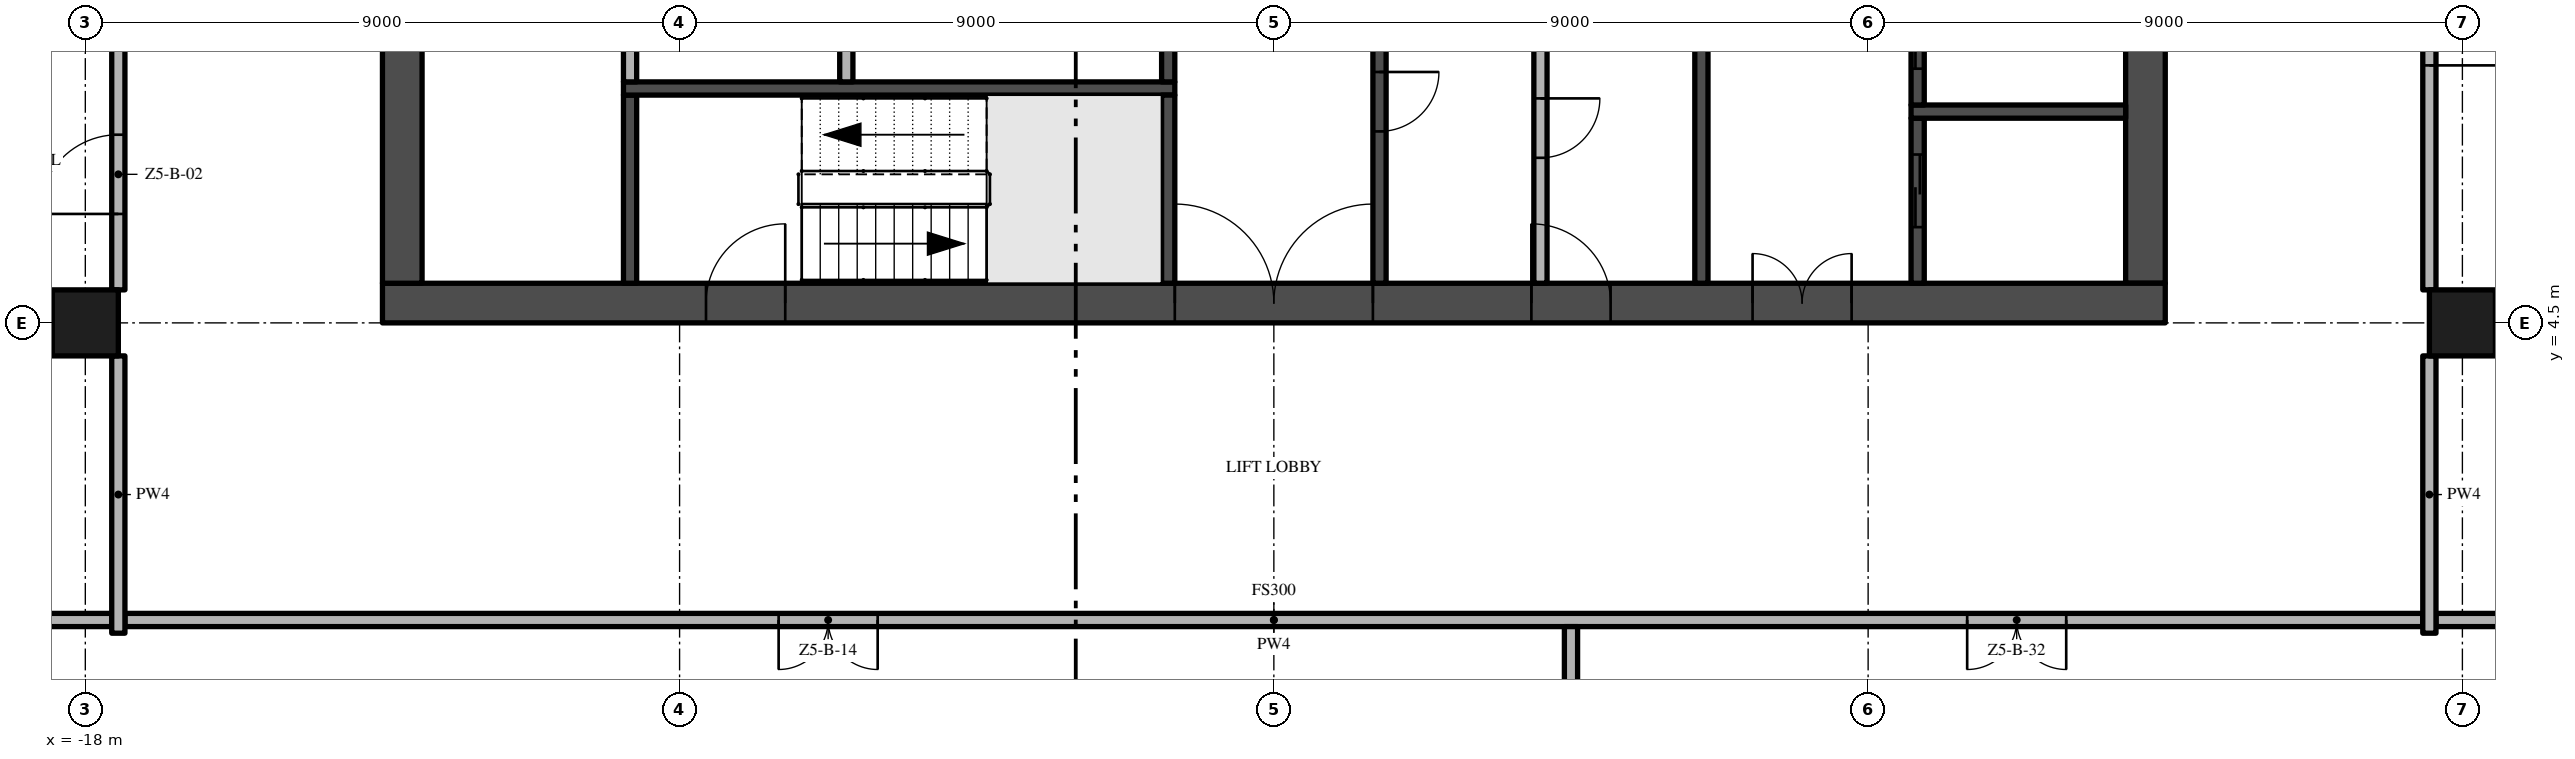
"""IFC4 building model, lengths in metres.
Left out: names, types, materials, properties, quantities, classifications, styles, units other than length and angle.
Written with IfcOpenShell. Run it as: python <this file> out.ifc"""

import sys

from ifc_helpers import new_model, si_unit, direction, frame, frame_2d, origin, origin_2d, place, context, subcontext, project, spatial, rectangle, extrude, element, fill, save


model = new_model("IFC4")
c1 = context("Model", 3, precision=1e-05, world=origin(), true_north=direction((0.0, 1.0)))
c2 = subcontext(c1, "Body", "Model", "MODEL_VIEW")
j1 = project(units=[si_unit("LENGTHUNIT", "METRE"), si_unit("PLANEANGLEUNIT", "RADIAN")], contexts=[c1])
p1 = place(None, origin())
s1 = spatial("IfcSite", under=j1, at=p1, CompositionType="ELEMENT")
p2 = place(p1, origin())
s2 = spatial("IfcBuilding", under=s1, at=p2, CompositionType="ELEMENT")
p3 = place(p2, frame((0.0, 0.0, 254.0)))
s3 = spatial("IfcBuildingStorey", under=s2, at=p3, CompositionType="ELEMENT", Elevation=254.0)
p4 = place(p3, frame((-13.5, 4.8, -0.3), z_axis=(0.0, 0.0, 1.0), x_axis=(1.0, 0.0, 0.0)))
e1 = element("IfcWall", 1, at=p4, inside=s3, PredefinedType="SHEAR", context=c2, shape_type="SweptSolid", body=[
    extrude(rectangle(XDim=27.0, YDim=0.6, at=frame_2d((13.5, 0.0))), origin(), (0.0, 0.0, 1.0), 3.8),
])
p5 = place(p4, frame((12.0, 0.0, 0.3)))
e2 = element("IfcOpeningElement", 2, at=p5, cuts=e1, PredefinedType="OPENING", context=c2, shape_type="SweptSolid", body=[
    extrude(rectangle(XDim=3.0, YDim=2.4, at=frame_2d((1.5, 1.2))), frame((0.0, 0.31, 0.0), z_axis=(0.0, -1.0, 0.0), x_axis=(1.0, 0.0, 0.0)), (0.0, 0.0, 1.0), 0.62),
])
p6 = place(p4, frame((4.9, 0.0, 0.3)))
e3 = element("IfcOpeningElement", 3, at=p6, cuts=e1, PredefinedType="OPENING", context=c2, shape_type="SweptSolid", body=[
    extrude(rectangle(XDim=1.2, YDim=2.2, at=frame_2d((0.6, 1.1))), frame((0.0, 0.31, 0.0), z_axis=(0.0, -1.0, 0.0), x_axis=(1.0, 0.0, 0.0)), (0.0, 0.0, 1.0), 0.62),
])
p7 = place(p4, frame((20.75, 0.0, 0.3)))
e4 = element("IfcOpeningElement", 4, at=p7, cuts=e1, PredefinedType="OPENING", context=c2, shape_type="SweptSolid", body=[
    extrude(rectangle(XDim=1.5, YDim=2.2, at=frame_2d((0.75, 1.1))), frame((0.0, 0.31, 0.0), z_axis=(0.0, -1.0, 0.0), x_axis=(1.0, 0.0, 0.0)), (0.0, 0.0, 1.0), 0.62),
])
p8 = place(p4, frame((17.4, 0.0, 0.3)))
e5 = element("IfcOpeningElement", 5, at=p8, cuts=e1, PredefinedType="OPENING", context=c2, shape_type="SweptSolid", body=[
    extrude(rectangle(XDim=1.2, YDim=2.2, at=frame_2d((0.6, 1.1))), frame((0.0, 0.31, 0.0), z_axis=(0.0, -1.0, 0.0), x_axis=(1.0, 0.0, 0.0)), (0.0, 0.0, 1.0), 0.62),
])
p9 = place(p3, frame((13.2, 5.1, -0.3), z_axis=(0.0, 0.0, 1.0), x_axis=(0.0, 1.0, 0.0)))
e6 = element("IfcWall", 6, at=p9, inside=s3, PredefinedType="SHEAR", context=c2, shape_type="SweptSolid", body=[
    extrude(rectangle(XDim=16.8, YDim=0.6, at=frame_2d((8.4, 0.0))), origin(), (0.0, 0.0, 1.0), 3.8),
])
p10 = place(p9, frame((6.3, 0.0, 0.3)))
e7 = element("IfcOpeningElement", 7, at=p10, cuts=e6, PredefinedType="OPENING", context=c2, shape_type="SweptSolid", body=[
    extrude(rectangle(XDim=1.2, YDim=2.2, at=frame_2d((0.6, 1.1))), frame((0.0, 0.31, 0.0), z_axis=(0.0, -1.0, 0.0), x_axis=(1.0, 0.0, 0.0)), (0.0, 0.0, 1.0), 0.62),
])
p11 = place(p3, frame((-13.2, 21.9, -0.3), z_axis=(0.0, 0.0, 1.0), x_axis=(0.0, -1.0, 0.0)))
e8 = element("IfcWall", 8, at=p11, inside=s3, PredefinedType="SHEAR", context=c2, shape_type="SweptSolid", body=[
    extrude(rectangle(XDim=16.8, YDim=0.6, at=frame_2d((8.4, 0.0))), origin(), (0.0, 0.0, 1.0), 3.8),
])
p12 = place(p11, frame((9.3, 0.0, 0.3)))
e9 = element("IfcOpeningElement", 9, at=p12, cuts=e8, PredefinedType="OPENING", context=c2, shape_type="SweptSolid", body=[
    extrude(rectangle(XDim=1.2, YDim=2.2, at=frame_2d((0.6, 1.1))), frame((0.0, 0.31, 0.0), z_axis=(0.0, -1.0, 0.0), x_axis=(1.0, 0.0, 0.0)), (0.0, 0.0, 1.0), 0.62),
])
for number, where, z_axis, x_axis in (
    (10, (-18.0, 4.5, 0.0), (0.0, 0.0, 1.0), (1.0, 0.0, 0.0)),
    (11, (18.0, 4.5, 0.0), (0.0, 0.0, 1.0), (1.0, 0.0, 0.0)),
):
    element("IfcColumn", number, at=place(p3, frame(where, z_axis=z_axis, x_axis=x_axis)), inside=s3, PredefinedType="COLUMN", context=c2, shape_type="SweptSolid", body=[
        extrude(rectangle(XDim=1.0, YDim=1.0, at=origin_2d()), origin(), (0.0, 0.0, 1.0), 3.5),
    ])
p13 = place(p3, frame((-9.75, 5.1, 0.0), z_axis=(0.0, 0.0, 1.0), x_axis=(0.0, 1.0, 0.0)))
e12 = element("IfcWall", 12, at=p13, inside=s3, PredefinedType="SHEAR", context=c2, shape_type="SweptSolid", body=[
    extrude(rectangle(XDim=2.85, YDim=0.2, at=frame_2d((1.425, 0.0))), origin(), (0.0, 0.0, 1.0), 3.5),
])
p14 = place(p3, frame((-9.85, 8.05, 0.0), z_axis=(0.0, 0.0, 1.0), x_axis=(1.0, 0.0, 0.0)))
e13 = element("IfcWall", 13, at=p14, inside=s3, PredefinedType="SHEAR", context=c2, shape_type="SweptSolid", body=[
    extrude(rectangle(XDim=8.35, YDim=0.2, at=frame_2d((4.175, 0.0))), origin(), (0.0, 0.0, 1.0), 3.5),
])
p15 = place(p3, frame((-9.75, 8.15, 0.0), z_axis=(0.0, 0.0, 1.0), x_axis=(0.0, 1.0, 0.0)))
e14 = element("IfcWall", 14, at=p15, inside=s3, PredefinedType="PARTITIONING", context=c2, shape_type="SweptSolid", body=[
    extrude(rectangle(XDim=1.85, YDim=0.2, at=frame_2d((0.925, 0.0))), origin(), (0.0, 0.0, 1.0), 3.5),
])
p16 = place(p15, frame((0.475, 0.0, 0.0)))
e15 = element("IfcOpeningElement", 15, at=p16, cuts=e14, PredefinedType="OPENING", context=c2, shape_type="SweptSolid", body=[
    extrude(rectangle(XDim=0.9, YDim=2.1, at=frame_2d((0.45, 1.05))), frame((0.0, 0.11, 0.0), z_axis=(0.0, -1.0, 0.0), x_axis=(1.0, 0.0, 0.0)), (0.0, 0.0, 1.0), 0.22),
])
p17 = place(p3, frame((-6.475, 8.15, 0.0), z_axis=(0.0, 0.0, 1.0), x_axis=(0.0, 1.0, 0.0)))
e16 = element("IfcWall", 16, at=p17, inside=s3, PredefinedType="PARTITIONING", context=c2, shape_type="SweptSolid", body=[
    extrude(rectangle(XDim=5.35, YDim=0.2, at=frame_2d((2.675, 0.0))), origin(), (0.0, 0.0, 1.0), 3.5),
])
p18 = place(p3, frame((-1.6, 5.1, 0.0), z_axis=(0.0, 0.0, 1.0), x_axis=(0.0, 1.0, 0.0)))
e17 = element("IfcWall", 17, at=p18, inside=s3, PredefinedType="SHEAR", context=c2, shape_type="SweptSolid", body=[
    extrude(rectangle(XDim=2.85, YDim=0.2, at=frame_2d((1.425, 0.0))), origin(), (0.0, 0.0, 1.0), 3.5),
])
p19 = place(p3, frame((-1.6, 8.15, 0.0), z_axis=(0.0, 0.0, 1.0), x_axis=(0.0, 1.0, 0.0)))
e18 = element("IfcWall", 18, at=p19, inside=s3, PredefinedType="SHEAR", context=c2, shape_type="SweptSolid", body=[
    extrude(rectangle(XDim=5.35, YDim=0.2, at=frame_2d((2.675, 0.0))), origin(), (0.0, 0.0, 1.0), 3.5),
])
p20 = place(p19, frame((2.225, 0.0, 0.0)))
e19 = element("IfcOpeningElement", 19, at=p20, cuts=e18, PredefinedType="OPENING", context=c2, shape_type="SweptSolid", body=[
    extrude(rectangle(XDim=0.9, YDim=2.1, at=frame_2d((0.45, 1.05))), frame((0.0, 0.11, 0.0), z_axis=(0.0, -1.0, 0.0), x_axis=(1.0, 0.0, 0.0)), (0.0, 0.0, 1.0), 0.22),
])
p21 = place(p3, frame((1.6, 9.8, 0.0), z_axis=(0.0, 0.0, 1.0), x_axis=(0.0, -1.0, 0.0)))
e20 = element("IfcWall", 20, at=p21, inside=s3, PredefinedType="SHEAR", context=c2, shape_type="SweptSolid", body=[
    extrude(rectangle(XDim=4.7, YDim=0.2, at=frame_2d((2.35, 0.0))), origin(), (0.0, 0.0, 1.0), 3.5),
])
p22 = place(p21, frame((1.5, 0.0, 0.0)))
e21 = element("IfcOpeningElement", 21, at=p22, cuts=e20, PredefinedType="OPENING", context=c2, shape_type="SweptSolid", body=[
    extrude(rectangle(XDim=0.9, YDim=2.1, at=frame_2d((0.45, 1.05))), frame((0.0, 0.11, 0.0), z_axis=(0.0, -1.0, 0.0), x_axis=(1.0, 0.0, 0.0)), (0.0, 0.0, 1.0), 0.22),
])
p23 = place(p3, frame((4.037, 9.8, 0.0), z_axis=(0.0, 0.0, 1.0), x_axis=(0.0, -1.0, 0.0)))
e22 = element("IfcWall", 22, at=p23, inside=s3, PredefinedType="PARTITIONING", context=c2, shape_type="SweptSolid", body=[
    extrude(rectangle(XDim=4.7, YDim=0.2, at=frame_2d((2.35, 0.0))), origin(), (0.0, 0.0, 1.0), 3.5),
])
p24 = place(p23, frame((1.9, 0.0, 0.0)))
e23 = element("IfcOpeningElement", 23, at=p24, cuts=e22, PredefinedType="OPENING", context=c2, shape_type="SweptSolid", body=[
    extrude(rectangle(XDim=0.9, YDim=2.1, at=frame_2d((0.45, 1.05))), frame((0.0, 0.11, 0.0), z_axis=(0.0, -1.0, 0.0), x_axis=(1.0, 0.0, 0.0)), (0.0, 0.0, 1.0), 0.22),
])
p25 = place(p3, frame((6.475, 5.1, 0.0), z_axis=(0.0, 0.0, 1.0), x_axis=(0.0, 1.0, 0.0)))
e24 = element("IfcWall", 24, at=p25, inside=s3, PredefinedType="SHEAR", context=c2, shape_type="SweptSolid", body=[
    extrude(rectangle(XDim=4.7, YDim=0.2, at=frame_2d((2.35, 0.0))), origin(), (0.0, 0.0, 1.0), 3.5),
])
p26 = place(p3, frame((9.75, 5.1, 0.0), z_axis=(0.0, 0.0, 1.0), x_axis=(0.0, 1.0, 0.0)))
e25 = element("IfcWall", 25, at=p26, inside=s3, PredefinedType="SHEAR", context=c2, shape_type="SweptSolid", body=[
    extrude(rectangle(XDim=2.5, YDim=0.2, at=frame_2d((1.25, 0.0))), origin(), (0.0, 0.0, 1.0), 3.5),
])
p27 = place(p26, frame((0.85, 0.0, 0.0)))
e26 = element("IfcOpeningElement", 26, at=p27, cuts=e25, PredefinedType="OPENING", context=c2, shape_type="SweptSolid", body=[
    extrude(rectangle(XDim=1.1, YDim=2.1, at=frame_2d((0.55, 1.05))), frame((0.0, 0.11, 0.0), z_axis=(0.0, -1.0, 0.0), x_axis=(1.0, 0.0, 0.0)), (0.0, 0.0, 1.0), 0.22),
])
p28 = place(p3, frame((9.65, 7.7, 0.0), z_axis=(0.0, 0.0, 1.0), x_axis=(1.0, 0.0, 0.0)))
e27 = element("IfcWall", 27, at=p28, inside=s3, PredefinedType="SHEAR", context=c2, shape_type="SweptSolid", body=[
    extrude(rectangle(XDim=3.25, YDim=0.2, at=frame_2d((1.625, 0.0))), origin(), (0.0, 0.0, 1.0), 3.5),
])
p29 = place(p3, frame((9.75, 7.8, 0.0), z_axis=(0.0, 0.0, 1.0), x_axis=(0.0, 1.0, 0.0)))
e28 = element("IfcWall", 28, at=p29, inside=s3, PredefinedType="SHEAR", context=c2, shape_type="SweptSolid", body=[
    extrude(rectangle(XDim=2.2, YDim=0.2, at=frame_2d((1.1, 0.0))), origin(), (0.0, 0.0, 1.0), 3.5),
])
p30 = place(p29, frame((0.55, 0.0, 0.0)))
e29 = element("IfcOpeningElement", 29, at=p30, cuts=e28, PredefinedType="OPENING", context=c2, shape_type="SweptSolid", body=[
    extrude(rectangle(XDim=1.1, YDim=2.1, at=frame_2d((0.55, 1.05))), frame((0.0, 0.11, 0.0), z_axis=(0.0, -1.0, 0.0), x_axis=(1.0, 0.0, 0.0)), (0.0, 0.0, 1.0), 0.22),
])
p31 = place(p3, frame((17.4, 0.0, 0.0), z_axis=(0.0, 0.0, 1.0), x_axis=(-1.0, 0.0, 0.0)))
e30 = element("IfcWall", 30, at=p31, inside=s3, PredefinedType="PARTITIONING", context=c2, shape_type="SweptSolid", body=[
    extrude(rectangle(XDim=34.8, YDim=0.2, at=frame_2d((17.4, 0.0))), origin(), (0.0, 0.0, 1.0), 3.5),
])
p32 = place(p31, frame((23.4, 0.0, 0.0)))
e31 = element("IfcOpeningElement", 31, at=p32, cuts=e30, PredefinedType="OPENING", context=c2, shape_type="SweptSolid", body=[
    extrude(rectangle(XDim=1.5, YDim=2.4, at=frame_2d((0.75, 1.2))), frame((0.0, 0.11, 0.0), z_axis=(0.0, -1.0, 0.0), x_axis=(1.0, 0.0, 0.0)), (0.0, 0.0, 1.0), 0.22),
])
p33 = place(p31, frame((5.4, 0.0, 0.0)))
e32 = element("IfcOpeningElement", 32, at=p33, cuts=e30, PredefinedType="OPENING", context=c2, shape_type="SweptSolid", body=[
    extrude(rectangle(XDim=1.5, YDim=2.4, at=frame_2d((0.75, 1.2))), frame((0.0, 0.11, 0.0), z_axis=(0.0, -1.0, 0.0), x_axis=(1.0, 0.0, 0.0)), (0.0, 0.0, 1.0), 0.22),
])
for number, where, z_axis, x_axis in (
    (33, (-26.7, 0.0, 0.0), (0.0, 0.0, 1.0), (1.0, 0.0, 0.0)),
    (34, (17.6, 0.0, 0.0), (0.0, 0.0, 1.0), (1.0, 0.0, 0.0)),
):
    element("IfcWall", number, at=place(p3, frame(where, z_axis=z_axis, x_axis=x_axis)), inside=s3, PredefinedType="PARTITIONING", context=c2, shape_type="SweptSolid", body=[
        extrude(rectangle(XDim=9.1, YDim=0.2, at=frame_2d((4.55, 0.0))), origin(), (0.0, 0.0, 1.0), 3.5),
    ])
p34 = place(p3, frame((-17.5, -0.2, 0.0), z_axis=(0.0, 0.0, 1.0), x_axis=(0.0, 1.0, 0.0)))
e35 = element("IfcWall", 35, at=p34, inside=s3, PredefinedType="PARTITIONING", context=c2, shape_type="SweptSolid", body=[
    extrude(rectangle(XDim=4.2, YDim=0.2, at=frame_2d((2.1, 0.0))), origin(), (0.0, 0.0, 1.0), 3.5),
])
p35 = place(p3, frame((-17.5, 5.0, 0.0), z_axis=(0.0, 0.0, 1.0), x_axis=(0.0, 1.0, 0.0)))
e36 = element("IfcWall", 36, at=p35, inside=s3, PredefinedType="PARTITIONING", context=c2, shape_type="SweptSolid", body=[
    extrude(rectangle(XDim=8.0, YDim=0.2, at=frame_2d((4.0, 0.0))), origin(), (0.0, 0.0, 1.0), 3.5),
])
p36 = place(p35, frame((1.15, 0.0, 0.0)))
e37 = element("IfcOpeningElement", 37, at=p36, cuts=e36, PredefinedType="OPENING", context=c2, shape_type="SweptSolid", body=[
    extrude(rectangle(XDim=1.2, YDim=2.4, at=frame_2d((0.6, 1.2))), frame((0.0, 0.11, 0.0), z_axis=(0.0, -1.0, 0.0), x_axis=(1.0, 0.0, 0.0)), (0.0, 0.0, 1.0), 0.22),
])
p37 = place(p3, frame((4.5, -22.2, 0.0), z_axis=(0.0, 0.0, 1.0), x_axis=(0.0, 1.0, 0.0)))
e38 = element("IfcWall", 38, at=p37, inside=s3, PredefinedType="PARTITIONING", context=c2, shape_type="SweptSolid", body=[
    extrude(rectangle(XDim=22.1, YDim=0.2, at=frame_2d((11.05, 0.0))), origin(), (0.0, 0.0, 1.0), 3.5),
])
p38 = place(p3, frame((17.5, -0.2, 0.0), z_axis=(0.0, 0.0, 1.0), x_axis=(0.0, 1.0, 0.0)))
e39 = element("IfcWall", 39, at=p38, inside=s3, PredefinedType="PARTITIONING", context=c2, shape_type="SweptSolid", body=[
    extrude(rectangle(XDim=4.2, YDim=0.2, at=frame_2d((2.1, 0.0))), origin(), (0.0, 0.0, 1.0), 3.5),
])
p39 = place(p3, frame((17.5, 13.0, 0.0), z_axis=(0.0, 0.0, 1.0), x_axis=(0.0, -1.0, 0.0)))
e40 = element("IfcWall", 40, at=p39, inside=s3, PredefinedType="PARTITIONING", context=c2, shape_type="SweptSolid", body=[
    extrude(rectangle(XDim=8.0, YDim=0.2, at=frame_2d((4.0, 0.0))), origin(), (0.0, 0.0, 1.0), 3.5),
])
p40 = place(p39, frame((3.4, 0.0, 0.0)))
e41 = element("IfcOpeningElement", 41, at=p40, cuts=e40, PredefinedType="OPENING", context=c2, shape_type="SweptSolid", body=[
    extrude(rectangle(XDim=1.2, YDim=2.4, at=frame_2d((0.6, 1.2))), frame((0.0, 0.11, 0.0), z_axis=(0.0, -1.0, 0.0), x_axis=(1.0, 0.0, 0.0)), (0.0, 0.0, 1.0), 0.22),
])
p41 = place(p5, frame((3.0, 0.0, 0.0), z_axis=(0.0, 0.0, 1.0), x_axis=(-1.0, 0.0, 0.0)))
e42 = element("IfcDoor", 42, at=p41, inside=s3, OperationType="DOUBLE_DOOR_SINGLE_SWING", PredefinedType="DOOR", context=c2, shape_type="SweptSolid", body=[
    extrude(rectangle(XDim=3.0, YDim=2.4, at=frame_2d((1.5, 1.2))), frame((0.0, 0.025, 0.0), z_axis=(0.0, -1.0, 0.0), x_axis=(1.0, 0.0, 0.0)), (0.0, 0.0, 1.0), 0.05),
])
fill(e2, e42)
p42 = place(p6, frame((1.2, 0.0, 0.0), z_axis=(0.0, 0.0, 1.0), x_axis=(-1.0, 0.0, 0.0)))
e43 = element("IfcDoor", 43, at=p42, inside=s3, OperationType="SINGLE_SWING_LEFT", PredefinedType="DOOR", context=c2, shape_type="SweptSolid", body=[
    extrude(rectangle(XDim=1.2, YDim=2.2, at=frame_2d((0.6, 1.1))), frame((0.0, 0.025, 0.0), z_axis=(0.0, -1.0, 0.0), x_axis=(1.0, 0.0, 0.0)), (0.0, 0.0, 1.0), 0.05),
])
fill(e3, e43)
p43 = place(p7, frame((1.5, 0.0, 0.0), z_axis=(0.0, 0.0, 1.0), x_axis=(-1.0, 0.0, 0.0)))
e44 = element("IfcDoor", 44, at=p43, inside=s3, OperationType="DOUBLE_DOOR_SINGLE_SWING", PredefinedType="DOOR", context=c2, shape_type="SweptSolid", body=[
    extrude(rectangle(XDim=1.5, YDim=2.2, at=frame_2d((0.75, 1.1))), frame((0.0, 0.025, 0.0), z_axis=(0.0, -1.0, 0.0), x_axis=(1.0, 0.0, 0.0)), (0.0, 0.0, 1.0), 0.05),
])
fill(e4, e44)
p44 = place(p8, frame((1.2, 0.0, 0.0), z_axis=(0.0, 0.0, 1.0), x_axis=(-1.0, 0.0, 0.0)))
e45 = element("IfcDoor", 45, at=p44, inside=s3, OperationType="SINGLE_SWING_RIGHT", PredefinedType="DOOR", context=c2, shape_type="SweptSolid", body=[
    extrude(rectangle(XDim=1.2, YDim=2.2, at=frame_2d((0.6, 1.1))), frame((0.0, 0.025, 0.0), z_axis=(0.0, -1.0, 0.0), x_axis=(1.0, 0.0, 0.0)), (0.0, 0.0, 1.0), 0.05),
])
fill(e5, e45)
p45 = place(p27, origin())
e46 = element("IfcDoor", 46, at=p45, inside=s3, OperationType="SLIDING_TO_RIGHT", PredefinedType="DOOR", context=c2, shape_type="SweptSolid", body=[
    extrude(rectangle(XDim=1.1, YDim=2.1, at=frame_2d((0.55, 1.05))), frame((0.0, 0.025, 0.0), z_axis=(0.0, -1.0, 0.0), x_axis=(1.0, 0.0, 0.0)), (0.0, 0.0, 1.0), 0.05),
])
fill(e26, e46)
p46 = place(p30, origin())
e47 = element("IfcDoor", 47, at=p46, inside=s3, OperationType="SLIDING_TO_RIGHT", PredefinedType="DOOR", context=c2, shape_type="SweptSolid", body=[
    extrude(rectangle(XDim=1.1, YDim=2.1, at=frame_2d((0.55, 1.05))), frame((0.0, 0.025, 0.0), z_axis=(0.0, -1.0, 0.0), x_axis=(1.0, 0.0, 0.0)), (0.0, 0.0, 1.0), 0.05),
])
fill(e29, e47)
p47 = place(p22, origin())
e48 = element("IfcDoor", 48, at=p47, inside=s3, OperationType="SINGLE_SWING_LEFT", PredefinedType="DOOR", context=c2, shape_type="SweptSolid", body=[
    extrude(rectangle(XDim=0.9, YDim=2.1, at=frame_2d((0.45, 1.05))), frame((0.0, 0.025, 0.0), z_axis=(0.0, -1.0, 0.0), x_axis=(1.0, 0.0, 0.0)), (0.0, 0.0, 1.0), 0.05),
])
fill(e21, e48)
p48 = place(p24, origin())
e49 = element("IfcDoor", 49, at=p48, inside=s3, OperationType="SINGLE_SWING_LEFT", PredefinedType="DOOR", context=c2, shape_type="SweptSolid", body=[
    extrude(rectangle(XDim=0.9, YDim=2.1, at=frame_2d((0.45, 1.05))), frame((0.0, 0.025, 0.0), z_axis=(0.0, -1.0, 0.0), x_axis=(1.0, 0.0, 0.0)), (0.0, 0.0, 1.0), 0.05),
])
fill(e23, e49)
p49 = place(p36, origin())
e50 = element("IfcDoor", 50, at=p49, inside=s3, OperationType="SINGLE_SWING_LEFT", PredefinedType="DOOR", context=c2, shape_type="SweptSolid", body=[
    extrude(rectangle(XDim=1.2, YDim=2.4, at=frame_2d((0.6, 1.2))), frame((0.0, 0.025, 0.0), z_axis=(0.0, -1.0, 0.0), x_axis=(1.0, 0.0, 0.0)), (0.0, 0.0, 1.0), 0.05),
])
fill(e37, e50)
p50 = place(p40, origin())
e51 = element("IfcDoor", 51, at=p50, inside=s3, OperationType="SINGLE_SWING_RIGHT", PredefinedType="DOOR", context=c2, shape_type="SweptSolid", body=[
    extrude(rectangle(XDim=1.2, YDim=2.4, at=frame_2d((0.6, 1.2))), frame((0.0, 0.025, 0.0), z_axis=(0.0, -1.0, 0.0), x_axis=(1.0, 0.0, 0.0)), (0.0, 0.0, 1.0), 0.05),
])
fill(e41, e51)
p51 = place(p32, origin())
e52 = element("IfcDoor", 52, at=p51, inside=s3, OperationType="DOUBLE_DOOR_SINGLE_SWING", PredefinedType="DOOR", context=c2, shape_type="SweptSolid", body=[
    extrude(rectangle(XDim=1.5, YDim=2.4, at=frame_2d((0.75, 1.2))), frame((0.0, 0.025, 0.0), z_axis=(0.0, -1.0, 0.0), x_axis=(1.0, 0.0, 0.0)), (0.0, 0.0, 1.0), 0.05),
])
fill(e31, e52)
p52 = place(p33, origin())
e53 = element("IfcDoor", 53, at=p52, inside=s3, OperationType="DOUBLE_DOOR_SINGLE_SWING", PredefinedType="DOOR", context=c2, shape_type="SweptSolid", body=[
    extrude(rectangle(XDim=1.5, YDim=2.4, at=frame_2d((0.75, 1.2))), frame((0.0, 0.025, 0.0), z_axis=(0.0, -1.0, 0.0), x_axis=(1.0, 0.0, 0.0)), (0.0, 0.0, 1.0), 0.05),
])
fill(e32, e53)
save(model, sys.argv[1])
